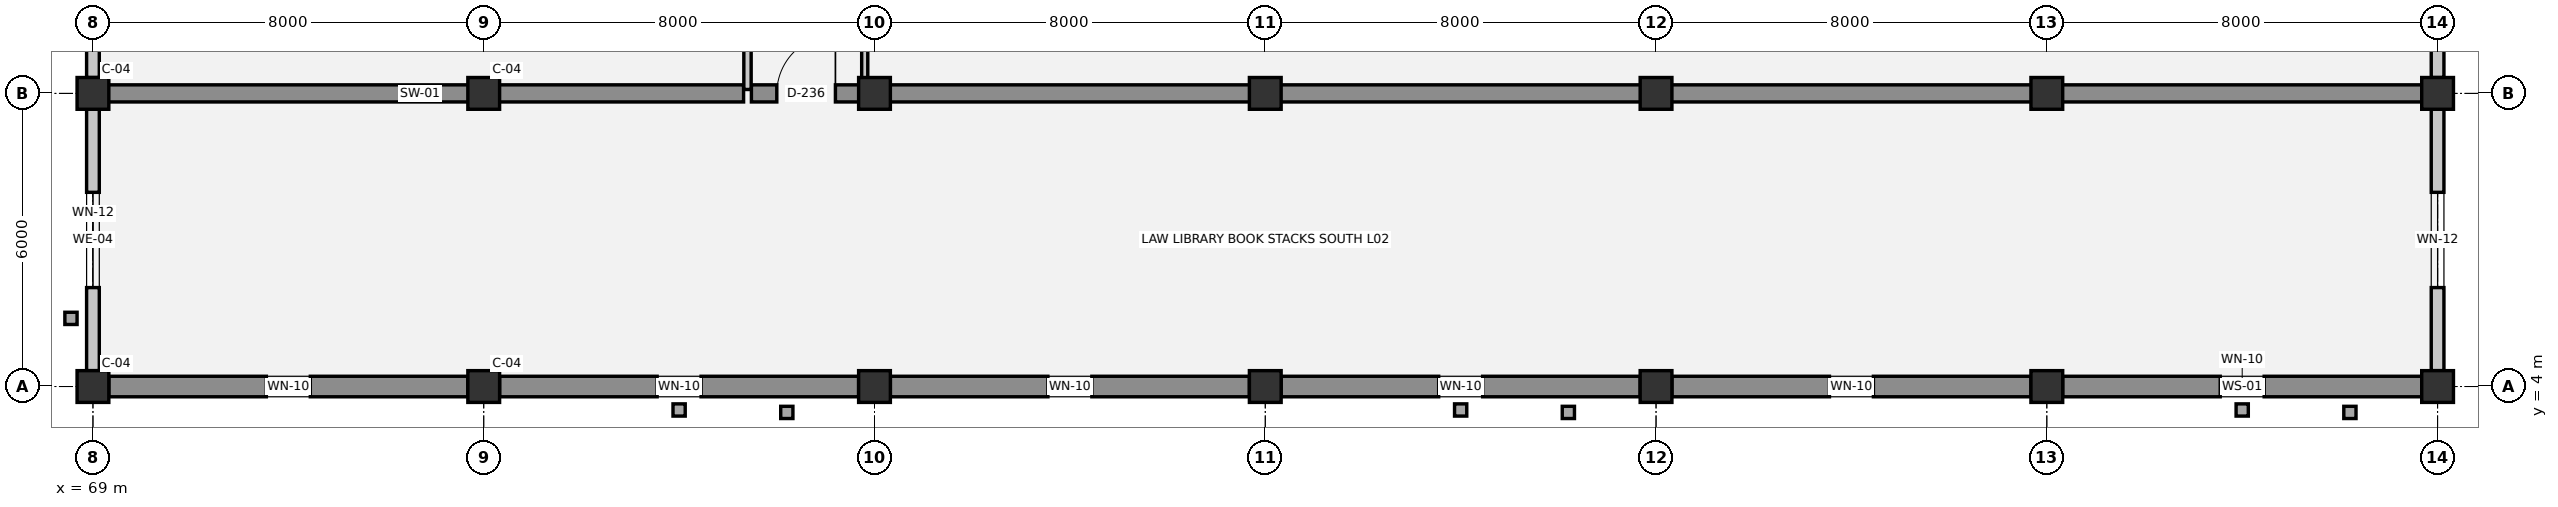
"""IFC4 building model, lengths in metres.
Left out: names, types, materials, properties, quantities, classifications, styles, units other than length and angle.
Written with IfcOpenShell. Run it as: python <this file> out.ifc"""

import sys

from ifc_helpers import new_model, si_unit, direction, frame, frame_2d, origin, origin_2d, place, context, subcontext, project, spatial, rectangle, extrude, element, fill, save


model = new_model("IFC4")
c1 = context("Model", 3, precision=1e-05, world=origin(), true_north=direction((0.0, 1.0)))
c2 = subcontext(c1, "Body", "Model", "MODEL_VIEW")
j1 = project(units=[si_unit("LENGTHUNIT", "METRE"), si_unit("PLANEANGLEUNIT", "RADIAN")], contexts=[c1])
p1 = place(None, origin())
s1 = spatial("IfcSite", under=j1, at=p1, CompositionType="ELEMENT")
p2 = place(p1, origin())
s2 = spatial("IfcBuilding", under=s1, at=p2, CompositionType="ELEMENT")
p3 = place(p2, frame((0.0, 0.0, 5.4)))
s3 = spatial("IfcBuildingStorey", under=s2, at=p3, CompositionType="ELEMENT", Elevation=5.4)
for number, where, z_axis, x_axis in (
    (1, (69.0, 4.0, 0.0), (0.0, 0.0, 1.0), (1.0, 0.0, 0.0)),
    (2, (69.0, 10.0, 0.0), (0.0, 0.0, 1.0), (1.0, 0.0, 0.0)),
    (3, (77.0, 4.0, 0.0), (0.0, 0.0, 1.0), (1.0, 0.0, 0.0)),
    (4, (77.0, 10.0, 0.0), (0.0, 0.0, 1.0), (1.0, 0.0, 0.0)),
    (5, (85.0, 4.0, 0.0), (0.0, 0.0, 1.0), (1.0, 0.0, 0.0)),
    (6, (85.0, 10.0, 0.0), (0.0, 0.0, 1.0), (1.0, 0.0, 0.0)),
    (7, (93.0, 4.0, 0.0), (0.0, 0.0, 1.0), (1.0, 0.0, 0.0)),
    (8, (93.0, 10.0, 0.0), (0.0, 0.0, 1.0), (1.0, 0.0, 0.0)),
    (9, (101.0, 4.0, 0.0), (0.0, 0.0, 1.0), (1.0, 0.0, 0.0)),
    (10, (101.0, 10.0, 0.0), (0.0, 0.0, 1.0), (1.0, 0.0, 0.0)),
    (11, (109.0, 4.0, 0.0), (0.0, 0.0, 1.0), (1.0, 0.0, 0.0)),
    (12, (109.0, 10.0, 0.0), (0.0, 0.0, 1.0), (1.0, 0.0, 0.0)),
    (13, (117.0, 4.0, 0.0), (0.0, 0.0, 1.0), (1.0, 0.0, 0.0)),
    (14, (117.0, 10.0, 0.0), (0.0, 0.0, 1.0), (1.0, 0.0, 0.0)),
):
    element("IfcColumn", number, at=place(p3, frame(where, z_axis=z_axis, x_axis=x_axis)), inside=s3, PredefinedType="COLUMN", context=c2, shape_type="SweptSolid", body=[
        extrude(rectangle(XDim=0.65, YDim=0.65, at=origin_2d()), origin(), (0.0, 0.0, 1.0), 4.5),
    ])
p4 = place(p3, frame((69.0, 4.325, 0.0), z_axis=(0.0, 0.0, 1.0), x_axis=(0.0, 1.0, 0.0)))
e15 = element("IfcWall", 15, at=p4, inside=s3, PredefinedType="SOLIDWALL", context=c2, shape_type="SweptSolid", body=[
    extrude(rectangle(XDim=5.35, YDim=0.26, at=frame_2d((2.675, 0.0))), origin(), (0.0, 0.0, 1.0), 3.44),
])
p5 = place(p4, frame((1.7, 0.0, 0.9)))
e16 = element("IfcOpeningElement", 16, at=p5, cuts=e15, PredefinedType="OPENING", context=c2, shape_type="SweptSolid", body=[
    extrude(rectangle(XDim=1.95, YDim=1.85, at=frame_2d((0.975, 0.925))), frame((0.0, 0.14, 0.0), z_axis=(0.0, -1.0, 0.0), x_axis=(1.0, 0.0, 0.0)), (0.0, 0.0, 1.0), 0.28),
])
p6 = place(p3, frame((69.0, 10.325, 0.0), z_axis=(0.0, 0.0, 1.0), x_axis=(0.0, 1.0, 0.0)))
e17 = element("IfcWall", 17, at=p6, inside=s3, PredefinedType="SOLIDWALL", context=c2, shape_type="SweptSolid", body=[
    extrude(rectangle(XDim=6.35, YDim=0.26, at=frame_2d((3.175, 0.0))), origin(), (0.0, 0.0, 1.0), 3.44),
])
p7 = place(p6, frame((2.675, 0.0, 0.0)))
e18 = element("IfcOpeningElement", 18, at=p7, cuts=e17, PredefinedType="OPENING", context=c2, shape_type="SweptSolid", body=[
    extrude(rectangle(XDim=1.8, YDim=2.25, at=frame_2d((0.9, 1.125))), frame((0.0, 0.14, 0.0), z_axis=(0.0, -1.0, 0.0), x_axis=(1.0, 0.0, 0.0)), (0.0, 0.0, 1.0), 0.28),
])
p8 = place(p3, frame((117.0, 16.675, 0.0), z_axis=(0.0, 0.0, 1.0), x_axis=(0.0, -1.0, 0.0)))
e19 = element("IfcWall", 19, at=p8, inside=s3, PredefinedType="SOLIDWALL", context=c2, shape_type="SweptSolid", body=[
    extrude(rectangle(XDim=6.35, YDim=0.26, at=frame_2d((3.175, 0.0))), origin(), (0.0, 0.0, 1.0), 3.44),
])
p9 = place(p8, frame((2.075, 0.0, 0.9)))
e20 = element("IfcOpeningElement", 20, at=p9, cuts=e19, PredefinedType="OPENING", context=c2, shape_type="SweptSolid", body=[
    extrude(rectangle(XDim=2.2, YDim=1.9, at=frame_2d((1.1, 0.95))), frame((0.0, 0.14, 0.0), z_axis=(0.0, -1.0, 0.0), x_axis=(1.0, 0.0, 0.0)), (0.0, 0.0, 1.0), 0.28),
])
p10 = place(p3, frame((117.0, 9.675, 0.0), z_axis=(0.0, 0.0, 1.0), x_axis=(0.0, -1.0, 0.0)))
e21 = element("IfcWall", 21, at=p10, inside=s3, PredefinedType="SOLIDWALL", context=c2, shape_type="SweptSolid", body=[
    extrude(rectangle(XDim=5.35, YDim=0.26, at=frame_2d((2.675, 0.0))), origin(), (0.0, 0.0, 1.0), 3.44),
])
p11 = place(p10, frame((1.7, 0.0, 0.9)))
e22 = element("IfcOpeningElement", 22, at=p11, cuts=e21, PredefinedType="OPENING", context=c2, shape_type="SweptSolid", body=[
    extrude(rectangle(XDim=1.95, YDim=1.85, at=frame_2d((0.975, 0.925))), frame((0.0, 0.14, 0.0), z_axis=(0.0, -1.0, 0.0), x_axis=(1.0, 0.0, 0.0)), (0.0, 0.0, 1.0), 0.28),
])
p12 = place(p3, frame((116.675, 4.0, 0.0), z_axis=(0.0, 0.0, 1.0), x_axis=(-1.0, 0.0, 0.0)))
e23 = element("IfcWall", 23, at=p12, inside=s3, PredefinedType="SOLIDWALL", context=c2, shape_type="SweptSolid", body=[
    extrude(rectangle(XDim=7.35, YDim=0.42, at=frame_2d((3.675, 0.0))), origin(), (0.0, 0.0, 1.0), 3.44),
])
p13 = place(p12, frame((3.225, 0.0, 0.9)))
e24 = element("IfcOpeningElement", 24, at=p13, cuts=e23, PredefinedType="OPENING", context=c2, shape_type="SweptSolid", body=[
    extrude(rectangle(XDim=0.9, YDim=2.1, at=frame_2d((0.45, 1.05))), frame((0.0, 0.22, 0.0), z_axis=(0.0, -1.0, 0.0), x_axis=(1.0, 0.0, 0.0)), (0.0, 0.0, 1.0), 0.44),
])
p14 = place(p3, frame((108.675, 4.0, 0.0), z_axis=(0.0, 0.0, 1.0), x_axis=(-1.0, 0.0, 0.0)))
e25 = element("IfcWall", 25, at=p14, inside=s3, PredefinedType="SOLIDWALL", context=c2, shape_type="SweptSolid", body=[
    extrude(rectangle(XDim=7.35, YDim=0.42, at=frame_2d((3.675, 0.0))), origin(), (0.0, 0.0, 1.0), 3.44),
])
p15 = place(p14, frame((3.225, 0.0, 0.9)))
e26 = element("IfcOpeningElement", 26, at=p15, cuts=e25, PredefinedType="OPENING", context=c2, shape_type="SweptSolid", body=[
    extrude(rectangle(XDim=0.9, YDim=2.1, at=frame_2d((0.45, 1.05))), frame((0.0, 0.22, 0.0), z_axis=(0.0, -1.0, 0.0), x_axis=(1.0, 0.0, 0.0)), (0.0, 0.0, 1.0), 0.44),
])
p16 = place(p3, frame((100.675, 4.0, 0.0), z_axis=(0.0, 0.0, 1.0), x_axis=(-1.0, 0.0, 0.0)))
e27 = element("IfcWall", 27, at=p16, inside=s3, PredefinedType="SOLIDWALL", context=c2, shape_type="SweptSolid", body=[
    extrude(rectangle(XDim=7.35, YDim=0.42, at=frame_2d((3.675, 0.0))), origin(), (0.0, 0.0, 1.0), 3.44),
])
p17 = place(p16, frame((3.225, 0.0, 0.9)))
e28 = element("IfcOpeningElement", 28, at=p17, cuts=e27, PredefinedType="OPENING", context=c2, shape_type="SweptSolid", body=[
    extrude(rectangle(XDim=0.9, YDim=2.1, at=frame_2d((0.45, 1.05))), frame((0.0, 0.22, 0.0), z_axis=(0.0, -1.0, 0.0), x_axis=(1.0, 0.0, 0.0)), (0.0, 0.0, 1.0), 0.44),
])
p18 = place(p3, frame((92.675, 4.0, 0.0), z_axis=(0.0, 0.0, 1.0), x_axis=(-1.0, 0.0, 0.0)))
e29 = element("IfcWall", 29, at=p18, inside=s3, PredefinedType="SOLIDWALL", context=c2, shape_type="SweptSolid", body=[
    extrude(rectangle(XDim=7.35, YDim=0.42, at=frame_2d((3.675, 0.0))), origin(), (0.0, 0.0, 1.0), 3.44),
])
p19 = place(p18, frame((3.225, 0.0, 0.9)))
e30 = element("IfcOpeningElement", 30, at=p19, cuts=e29, PredefinedType="OPENING", context=c2, shape_type="SweptSolid", body=[
    extrude(rectangle(XDim=0.9, YDim=2.1, at=frame_2d((0.45, 1.05))), frame((0.0, 0.22, 0.0), z_axis=(0.0, -1.0, 0.0), x_axis=(1.0, 0.0, 0.0)), (0.0, 0.0, 1.0), 0.44),
])
p20 = place(p3, frame((84.675, 4.0, 0.0), z_axis=(0.0, 0.0, 1.0), x_axis=(-1.0, 0.0, 0.0)))
e31 = element("IfcWall", 31, at=p20, inside=s3, PredefinedType="SOLIDWALL", context=c2, shape_type="SweptSolid", body=[
    extrude(rectangle(XDim=7.35, YDim=0.42, at=frame_2d((3.675, 0.0))), origin(), (0.0, 0.0, 1.0), 3.44),
])
p21 = place(p20, frame((3.225, 0.0, 0.9)))
e32 = element("IfcOpeningElement", 32, at=p21, cuts=e31, PredefinedType="OPENING", context=c2, shape_type="SweptSolid", body=[
    extrude(rectangle(XDim=0.9, YDim=2.1, at=frame_2d((0.45, 1.05))), frame((0.0, 0.22, 0.0), z_axis=(0.0, -1.0, 0.0), x_axis=(1.0, 0.0, 0.0)), (0.0, 0.0, 1.0), 0.44),
])
p22 = place(p3, frame((76.675, 4.0, 0.0), z_axis=(0.0, 0.0, 1.0), x_axis=(-1.0, 0.0, 0.0)))
e33 = element("IfcWall", 33, at=p22, inside=s3, PredefinedType="SOLIDWALL", context=c2, shape_type="SweptSolid", body=[
    extrude(rectangle(XDim=7.35, YDim=0.42, at=frame_2d((3.675, 0.0))), origin(), (0.0, 0.0, 1.0), 3.44),
])
p23 = place(p22, frame((3.225, 0.0, 0.9)))
e34 = element("IfcOpeningElement", 34, at=p23, cuts=e33, PredefinedType="OPENING", context=c2, shape_type="SweptSolid", body=[
    extrude(rectangle(XDim=0.9, YDim=2.1, at=frame_2d((0.45, 1.05))), frame((0.0, 0.22, 0.0), z_axis=(0.0, -1.0, 0.0), x_axis=(1.0, 0.0, 0.0)), (0.0, 0.0, 1.0), 0.44),
])
p24 = place(p3, frame((69.08, 10.0, 0.0), z_axis=(0.0, 0.0, 1.0), x_axis=(1.0, 0.0, 0.0)))
e35 = element("IfcWall", 35, at=p24, inside=s3, PredefinedType="SHEAR", context=c2, shape_type="SweptSolid", body=[
    extrude(rectangle(XDim=13.24, YDim=0.35, at=frame_2d((6.62, 0.0))), origin(), (0.0, 0.0, 1.0), 4.14),
])
p25 = place(p3, frame((82.48, 10.0, 0.0), z_axis=(0.0, 0.0, 1.0), x_axis=(1.0, 0.0, 0.0)))
e36 = element("IfcWall", 36, at=p25, inside=s3, PredefinedType="SHEAR", context=c2, shape_type="SweptSolid", body=[
    extrude(rectangle(XDim=2.24, YDim=0.35, at=frame_2d((1.12, 0.0))), origin(), (0.0, 0.0, 1.0), 4.14),
])
p26 = place(p25, frame((0.52, 0.0, 0.0)))
e37 = element("IfcOpeningElement", 37, at=p26, cuts=e36, PredefinedType="OPENING", context=c2, shape_type="SweptSolid", body=[
    extrude(rectangle(XDim=1.2, YDim=2.15, at=frame_2d((0.6, 1.075))), frame((0.0, 0.185, 0.0), z_axis=(0.0, -1.0, 0.0), x_axis=(1.0, 0.0, 0.0)), (0.0, 0.0, 1.0), 0.37),
])
p27 = place(p3, frame((84.88, 10.0, 0.0), z_axis=(0.0, 0.0, 1.0), x_axis=(1.0, 0.0, 0.0)))
e38 = element("IfcWall", 38, at=p27, inside=s3, PredefinedType="SHEAR", context=c2, shape_type="SweptSolid", body=[
    extrude(rectangle(XDim=32.04, YDim=0.35, at=frame_2d((16.02, 0.0))), origin(), (0.0, 0.0, 1.0), 4.14),
])
p28 = place(p3, frame((82.4, 10.08, 0.0), z_axis=(0.0, 0.0, 1.0), x_axis=(0.0, 1.0, 0.0)))
e39 = element("IfcWall", 39, at=p28, inside=s3, PredefinedType="PARTITIONING", context=c2, shape_type="SweptSolid", body=[
    extrude(rectangle(XDim=14.84, YDim=0.15, at=frame_2d((7.42, 0.0))), origin(), (0.0, 0.0, 1.0), 4.14),
])
p29 = place(p28, frame((6.79, 0.0, 0.0)))
e40 = element("IfcOpeningElement", 40, at=p29, cuts=e39, PredefinedType="OPENING", context=c2, shape_type="SweptSolid", body=[
    extrude(rectangle(XDim=1.26, YDim=2.2, at=frame_2d((0.63, 1.1))), frame((0.0, 0.085, 0.0), z_axis=(0.0, -1.0, 0.0), x_axis=(1.0, 0.0, 0.0)), (0.0, 0.0, 1.0), 0.17),
])
p30 = place(p3, frame((84.8, 10.08, 0.0), z_axis=(0.0, 0.0, 1.0), x_axis=(0.0, 1.0, 0.0)))
e41 = element("IfcWall", 41, at=p30, inside=s3, PredefinedType="PARTITIONING", context=c2, shape_type="SweptSolid", body=[
    extrude(rectangle(XDim=14.84, YDim=0.125, at=frame_2d((7.42, 0.0))), origin(), (0.0, 0.0, 1.0), 3.61),
])
p31 = place(p5, origin())
e42 = element("IfcWindow", 42, at=p31, inside=s3, PartitioningType="SINGLE_PANEL", PredefinedType="WINDOW", context=c2, shape_type="SweptSolid", body=[
    extrude(rectangle(XDim=1.95, YDim=1.85, at=frame_2d((0.975, 0.925))), frame((0.0, 0.03, 0.0), z_axis=(0.0, -1.0, 0.0), x_axis=(1.0, 0.0, 0.0)), (0.0, 0.0, 1.0), 0.06),
])
fill(e16, e42)
p32 = place(p11, origin())
e43 = element("IfcWindow", 43, at=p32, inside=s3, PartitioningType="SINGLE_PANEL", PredefinedType="WINDOW", context=c2, shape_type="SweptSolid", body=[
    extrude(rectangle(XDim=1.95, YDim=1.85, at=frame_2d((0.975, 0.925))), frame((0.0, 0.03, 0.0), z_axis=(0.0, -1.0, 0.0), x_axis=(1.0, 0.0, 0.0)), (0.0, 0.0, 1.0), 0.06),
])
fill(e22, e43)
p33 = place(p13, origin())
e44 = element("IfcWindow", 44, at=p33, inside=s3, PartitioningType="SINGLE_PANEL", PredefinedType="WINDOW", context=c2, shape_type="SweptSolid", body=[
    extrude(rectangle(XDim=0.9, YDim=2.1, at=frame_2d((0.45, 1.05))), frame((0.0, 0.03, 0.0), z_axis=(0.0, -1.0, 0.0), x_axis=(1.0, 0.0, 0.0)), (0.0, 0.0, 1.0), 0.06),
])
fill(e24, e44)
p34 = place(p15, origin())
e45 = element("IfcWindow", 45, at=p34, inside=s3, PartitioningType="SINGLE_PANEL", PredefinedType="WINDOW", context=c2, shape_type="SweptSolid", body=[
    extrude(rectangle(XDim=0.9, YDim=2.1, at=frame_2d((0.45, 1.05))), frame((0.0, 0.03, 0.0), z_axis=(0.0, -1.0, 0.0), x_axis=(1.0, 0.0, 0.0)), (0.0, 0.0, 1.0), 0.06),
])
fill(e26, e45)
p35 = place(p17, origin())
e46 = element("IfcWindow", 46, at=p35, inside=s3, PartitioningType="SINGLE_PANEL", PredefinedType="WINDOW", context=c2, shape_type="SweptSolid", body=[
    extrude(rectangle(XDim=0.9, YDim=2.1, at=frame_2d((0.45, 1.05))), frame((0.0, 0.03, 0.0), z_axis=(0.0, -1.0, 0.0), x_axis=(1.0, 0.0, 0.0)), (0.0, 0.0, 1.0), 0.06),
])
fill(e28, e46)
p36 = place(p19, origin())
e47 = element("IfcWindow", 47, at=p36, inside=s3, PartitioningType="SINGLE_PANEL", PredefinedType="WINDOW", context=c2, shape_type="SweptSolid", body=[
    extrude(rectangle(XDim=0.9, YDim=2.1, at=frame_2d((0.45, 1.05))), frame((0.0, 0.03, 0.0), z_axis=(0.0, -1.0, 0.0), x_axis=(1.0, 0.0, 0.0)), (0.0, 0.0, 1.0), 0.06),
])
fill(e30, e47)
p37 = place(p21, origin())
e48 = element("IfcWindow", 48, at=p37, inside=s3, PartitioningType="SINGLE_PANEL", PredefinedType="WINDOW", context=c2, shape_type="SweptSolid", body=[
    extrude(rectangle(XDim=0.9, YDim=2.1, at=frame_2d((0.45, 1.05))), frame((0.0, 0.03, 0.0), z_axis=(0.0, -1.0, 0.0), x_axis=(1.0, 0.0, 0.0)), (0.0, 0.0, 1.0), 0.06),
])
fill(e32, e48)
p38 = place(p23, origin())
e49 = element("IfcWindow", 49, at=p38, inside=s3, PartitioningType="SINGLE_PANEL", PredefinedType="WINDOW", context=c2, shape_type="SweptSolid", body=[
    extrude(rectangle(XDim=0.9, YDim=2.1, at=frame_2d((0.45, 1.05))), frame((0.0, 0.03, 0.0), z_axis=(0.0, -1.0, 0.0), x_axis=(1.0, 0.0, 0.0)), (0.0, 0.0, 1.0), 0.06),
])
fill(e34, e49)
p39 = place(p26, origin())
e50 = element("IfcDoor", 50, at=p39, inside=s3, OperationType="SINGLE_SWING_RIGHT", PredefinedType="DOOR", context=c2, shape_type="SweptSolid", body=[
    extrude(rectangle(XDim=1.2, YDim=2.15, at=frame_2d((0.6, 1.075))), frame((0.0, 0.025, 0.0), z_axis=(0.0, -1.0, 0.0), x_axis=(1.0, 0.0, 0.0)), (0.0, 0.0, 1.0), 0.05),
])
fill(e37, e50)
save(model, sys.argv[1])
